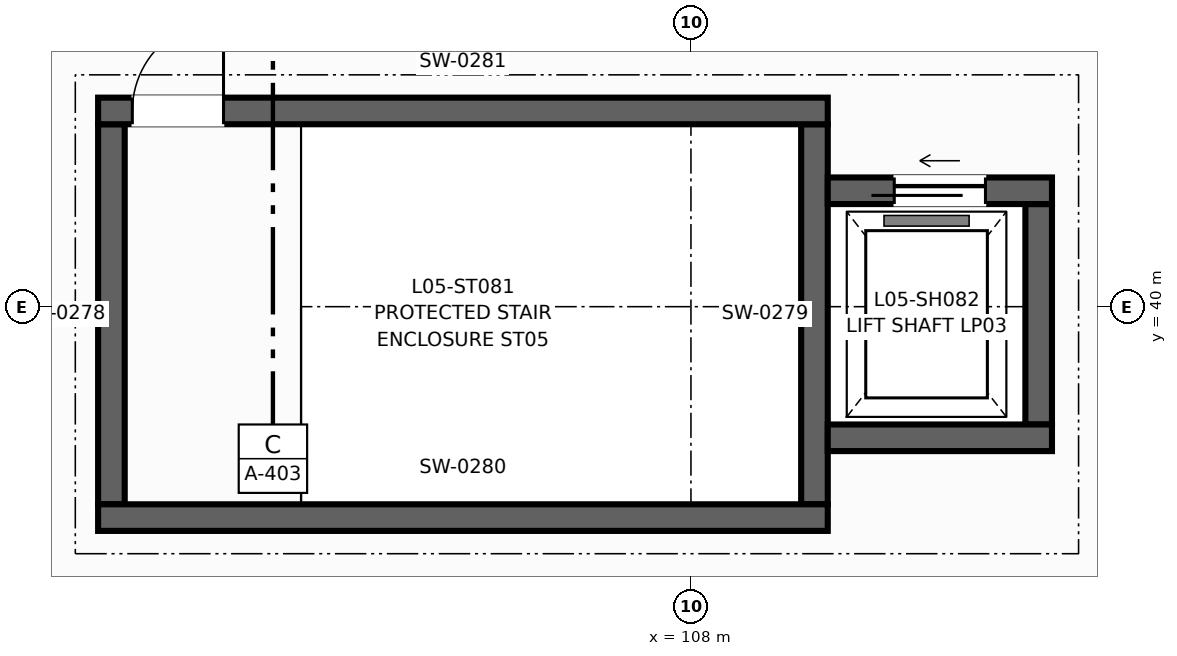
"""IFC4 building model, lengths in metres.
Left out: names, types, materials, properties, quantities, classifications, styles, units other than length and angle.
Written with IfcOpenShell. Run it as: python <this file> out.ifc"""

import sys

from ifc_helpers import new_model, si_unit, direction, frame, frame_2d, origin, place, context, subcontext, project, spatial, rectangle, extrude, element, fill, save


model = new_model("IFC4")
c1 = context("Model", 3, precision=1e-05, world=origin(), true_north=direction((0.0, 1.0)))
c2 = subcontext(c1, "Body", "Model", "MODEL_VIEW")
j1 = project(units=[si_unit("LENGTHUNIT", "METRE"), si_unit("PLANEANGLEUNIT", "RADIAN")], contexts=[c1])
p1 = place(None, origin())
s1 = spatial("IfcSite", under=j1, at=p1, CompositionType="ELEMENT")
p2 = place(p1, origin())
s2 = spatial("IfcBuilding", under=s1, at=p2, CompositionType="ELEMENT")
p3 = place(p2, frame((0.0, 0.0, 22.5)))
s3 = spatial("IfcBuildingStorey", under=s2, at=p3, CompositionType="ELEMENT", Elevation=22.5)
for number, where, z_axis, x_axis in (
    (1, (100.375, 37.4, 0.0), (0.0, 0.0, 1.0), (0.0, 1.0, 0.0)),
    (2, (109.625, 37.4, 0.0), (0.0, 0.0, 1.0), (0.0, 1.0, 0.0)),
):
    element("IfcWall", number, at=place(p3, frame(where, z_axis=z_axis, x_axis=x_axis)), inside=s3, PredefinedType="SHEAR", context=c2, shape_type="SweptSolid", body=[
        extrude(rectangle(XDim=5.0, YDim=0.35, at=frame_2d((2.5, 0.0))), origin(), (0.0, 0.0, 1.0), 4.28),
    ])
p4 = place(p3, frame((100.2, 37.225, 0.0), z_axis=(0.0, 0.0, 1.0), x_axis=(1.0, 0.0, 0.0)))
e3 = element("IfcWall", 3, at=p4, inside=s3, PredefinedType="SHEAR", context=c2, shape_type="SweptSolid", body=[
    extrude(rectangle(XDim=9.6, YDim=0.35, at=frame_2d((4.8, 0.0))), origin(), (0.0, 0.0, 1.0), 4.28),
])
p5 = place(p3, frame((100.2, 42.575, 0.0), z_axis=(0.0, 0.0, 1.0), x_axis=(1.0, 0.0, 0.0)))
e4 = element("IfcWall", 4, at=p5, inside=s3, PredefinedType="SHEAR", context=c2, shape_type="SweptSolid", body=[
    extrude(rectangle(XDim=9.6, YDim=0.35, at=frame_2d((4.8, 0.0))), origin(), (0.0, 0.0, 1.0), 4.28),
])
p6 = place(p5, frame((0.45, 0.0, 0.0)))
e5 = element("IfcOpeningElement", 5, at=p6, cuts=e4, PredefinedType="OPENING", context=c2, shape_type="SweptSolid", body=[
    extrude(rectangle(XDim=1.2, YDim=2.2, at=frame_2d((0.6, 1.1))), frame((0.0, 0.185, 0.0), z_axis=(0.0, -1.0, 0.0), x_axis=(1.0, 0.0, 0.0)), (0.0, 0.0, 1.0), 0.37),
])
p7 = place(p3, frame((112.575, 38.45, 0.0), z_axis=(0.0, 0.0, 1.0), x_axis=(0.0, 1.0, 0.0)))
e6 = element("IfcWall", 6, at=p7, inside=s3, PredefinedType="SHEAR", context=c2, shape_type="SweptSolid", body=[
    extrude(rectangle(XDim=2.9, YDim=0.35, at=frame_2d((1.45, 0.0))), origin(), (0.0, 0.0, 1.0), 4.28),
])
p8 = place(p3, frame((109.8, 38.275, 0.0), z_axis=(0.0, 0.0, 1.0), x_axis=(1.0, 0.0, 0.0)))
e7 = element("IfcWall", 7, at=p8, inside=s3, PredefinedType="SHEAR", context=c2, shape_type="SweptSolid", body=[
    extrude(rectangle(XDim=2.95, YDim=0.35, at=frame_2d((1.475, 0.0))), origin(), (0.0, 0.0, 1.0), 4.28),
])
p9 = place(p3, frame((109.8, 41.525, 0.0), z_axis=(0.0, 0.0, 1.0), x_axis=(1.0, 0.0, 0.0)))
e8 = element("IfcWall", 8, at=p9, inside=s3, PredefinedType="SHEAR", context=c2, shape_type="SweptSolid", body=[
    extrude(rectangle(XDim=2.95, YDim=0.35, at=frame_2d((1.475, 0.0))), origin(), (0.0, 0.0, 1.0), 4.28),
])
p10 = place(p9, frame((0.875, 0.0, 0.0)))
e9 = element("IfcOpeningElement", 9, at=p10, cuts=e8, PredefinedType="OPENING", context=c2, shape_type="SweptSolid", body=[
    extrude(rectangle(XDim=1.2, YDim=2.2, at=frame_2d((0.6, 1.1))), frame((0.0, 0.185, 0.0), z_axis=(0.0, -1.0, 0.0), x_axis=(1.0, 0.0, 0.0)), (0.0, 0.0, 1.0), 0.37),
])
p11 = place(p6, origin())
e10 = element("IfcDoor", 10, at=p11, inside=s3, OperationType="SINGLE_SWING_RIGHT", PredefinedType="DOOR", context=c2, shape_type="SweptSolid", body=[
    extrude(rectangle(XDim=1.2, YDim=2.2, at=frame_2d((0.6, 1.1))), frame((0.0, 0.025, 0.0), z_axis=(0.0, -1.0, 0.0), x_axis=(1.0, 0.0, 0.0)), (0.0, 0.0, 1.0), 0.05),
])
fill(e5, e10)
p12 = place(p10, origin())
e11 = element("IfcDoor", 11, at=p12, inside=s3, OperationType="SLIDING_TO_LEFT", PredefinedType="DOOR", context=c2, shape_type="SweptSolid", body=[
    extrude(rectangle(XDim=1.2, YDim=2.2, at=frame_2d((0.6, 1.1))), frame((0.0, 0.025, 0.0), z_axis=(0.0, -1.0, 0.0), x_axis=(1.0, 0.0, 0.0)), (0.0, 0.0, 1.0), 0.05),
])
fill(e9, e11)
save(model, sys.argv[1])
